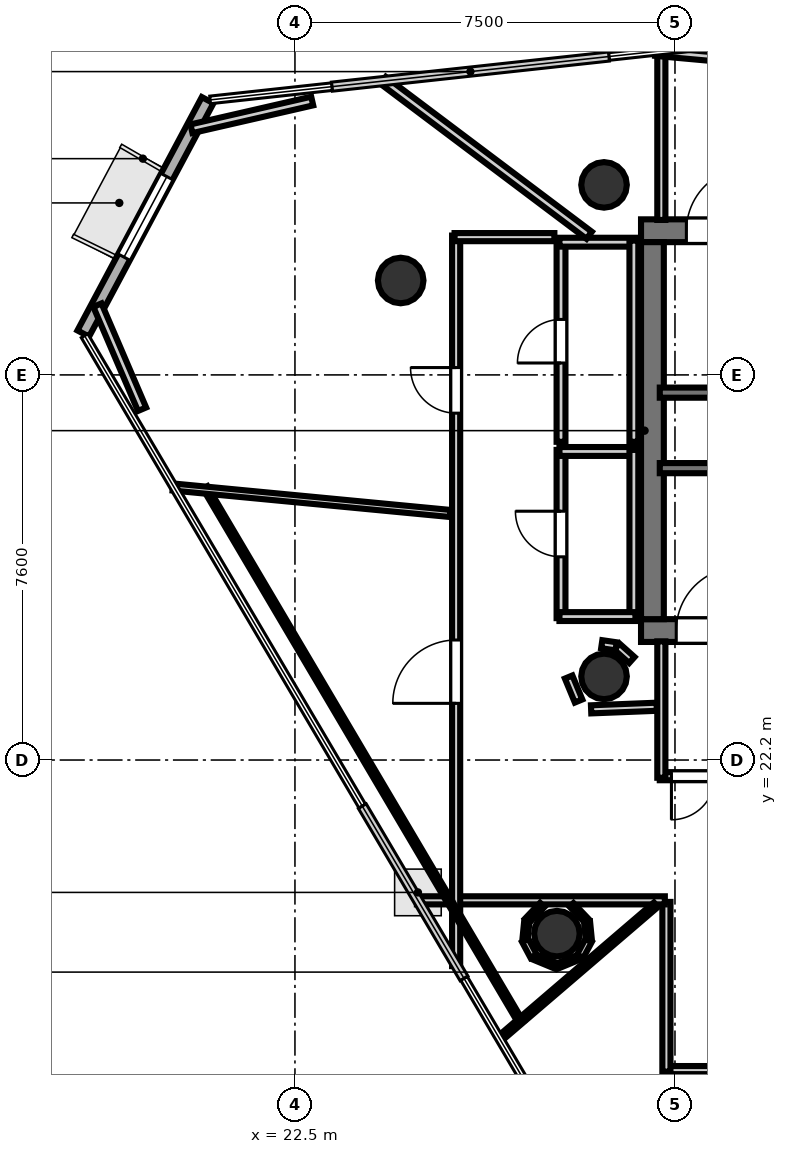
"""IFC4 building model, lengths in metres.
Left out: names, types, materials, properties, quantities, classifications, styles, units other than length and angle.
Written with IfcOpenShell. Run it as: python <this file> out.ifc"""

import sys

from ifc_helpers import new_model, si_unit, direction, frame, frame_2d, origin, origin_2d, place, context, subcontext, project, spatial, rectangle, hollow_circle, extrude, element, fill, save


model = new_model("IFC4")
c1 = context("Model", 3, precision=1e-05, world=origin(), true_north=direction((0.0, 1.0)))
c2 = subcontext(c1, "Body", "Model", "MODEL_VIEW")
j1 = project(units=[si_unit("LENGTHUNIT", "METRE"), si_unit("PLANEANGLEUNIT", "RADIAN")], contexts=[c1])
p1 = place(None, origin())
s1 = spatial("IfcSite", under=j1, at=p1, CompositionType="ELEMENT")
p2 = place(p1, origin())
s2 = spatial("IfcBuilding", under=s1, at=p2, CompositionType="ELEMENT")
p3 = place(p2, frame((0.0, 0.0, 280.6)))
s3 = spatial("IfcBuildingStorey", under=s2, at=p3, CompositionType="ELEMENT", Elevation=280.6)
p4 = place(p3, frame((29.33, 32.645, 0.0), z_axis=(0.0, 0.0, 1.0), x_axis=(1.0, 0.0, 0.0)))
e1 = element("IfcWall", 1, at=p4, inside=s3, PredefinedType="SHEAR", context=c2, shape_type="SweptSolid", body=[
    extrude(rectangle(XDim=10.52, YDim=0.45, at=frame_2d((5.26, 0.0))), origin(), (0.0, 0.0, 1.0), 3.52),
])
p5 = place(p4, frame((0.895, 0.0, 0.0)))
e2 = element("IfcOpeningElement", 2, at=p5, cuts=e1, PredefinedType="OPENING", context=c2, shape_type="SweptSolid", body=[
    extrude(rectangle(XDim=1.25, YDim=2.15, at=frame_2d((0.625, 1.075))), frame((0.0, 0.235, 0.0), z_axis=(0.0, -1.0, 0.0), x_axis=(1.0, 0.0, 0.0)), (0.0, 0.0, 1.0), 0.47),
])
p6 = place(p3, frame((29.33, 24.755, 0.0), z_axis=(0.0, 0.0, 1.0), x_axis=(1.0, 0.0, 0.0)))
e3 = element("IfcWall", 3, at=p6, inside=s3, PredefinedType="SHEAR", context=c2, shape_type="SweptSolid", body=[
    extrude(rectangle(XDim=10.52, YDim=0.45, at=frame_2d((5.26, 0.0))), origin(), (0.0, 0.0, 1.0), 3.52),
])
p7 = place(p6, frame((0.695, 0.0, 0.0)))
e4 = element("IfcOpeningElement", 4, at=p7, cuts=e3, PredefinedType="OPENING", context=c2, shape_type="SweptSolid", body=[
    extrude(rectangle(XDim=1.25, YDim=2.15, at=frame_2d((0.625, 1.075))), frame((0.0, 0.235, 0.0), z_axis=(0.0, -1.0, 0.0), x_axis=(1.0, 0.0, 0.0)), (0.0, 0.0, 1.0), 0.47),
])
p8 = place(p3, frame((29.555, 24.98, 0.0), z_axis=(0.0, 0.0, 1.0), x_axis=(0.0, 1.0, 0.0)))
e5 = element("IfcWall", 5, at=p8, inside=s3, PredefinedType="SHEAR", context=c2, shape_type="SweptSolid", body=[
    extrude(rectangle(XDim=7.44, YDim=0.45, at=frame_2d((3.72, 0.0))), origin(), (0.0, 0.0, 1.0), 3.52),
])
for number, where, z_axis, x_axis in (
    (6, (28.6, 33.55, 0.0), (0.0, 0.0, 1.0), (1.0, 0.0, 0.0)),
    (7, (28.6, 23.85, 0.0), (0.0, 0.0, 1.0), (1.0, 0.0, 0.0)),
):
    element("IfcColumn", number, at=place(p3, frame(where, z_axis=z_axis, x_axis=x_axis)), inside=s3, PredefinedType="COLUMN", context=c2, shape_type="SweptSolid", body=[
        extrude(hollow_circle(Radius=0.45, WallThickness=0.025, at=origin_2d()), origin(), (0.0, 0.0, 1.0), 3.7),
    ])
for number, where, z_axis, x_axis in (
    (8, (24.587, 31.663, -0.23), (0.0, 0.0, 1.0), (1.0, 0.0, 0.0)),
    (9, (27.67, 18.774, -0.23), (0.0, 0.0, 1.0), (1.0, 0.0, 0.0)),
):
    element("IfcColumn", number, at=place(p3, frame(where, z_axis=z_axis, x_axis=x_axis)), inside=s3, PredefinedType="COLUMN", context=c2, shape_type="SweptSolid", body=[
        extrude(hollow_circle(Radius=0.45, WallThickness=0.025, at=origin_2d()), origin(), (0.0, 0.0, 1.0), 3.93),
    ])
p9 = place(p3, frame((20.777, 35.221, 0.0), z_axis=(0.0, 0.0, 1.0), x_axis=(-0.470359968521, -0.882474645535, 0.0)))
e10 = element("IfcWall", 10, at=p9, inside=s3, PredefinedType="SOLIDWALL", context=c2, shape_type="SweptSolid", body=[
    extrude(rectangle(XDim=5.219, YDim=0.26, at=frame_2d((2.609, 0.0))), origin(), (0.0, 0.0, 1.0), 3.52),
])
p10 = place(p9, frame((1.709, 0.0, 0.85)))
e11 = element("IfcOpeningElement", 11, at=p10, cuts=e10, PredefinedType="OPENING", context=c2, shape_type="SweptSolid", body=[
    extrude(rectangle(XDim=1.8, YDim=2.1, at=frame_2d((0.9, 1.05))), frame((0.0, 0.14, 0.0), z_axis=(0.0, -1.0, 0.0), x_axis=(1.0, 0.0, 0.0)), (0.0, 0.0, 1.0), 0.28),
])
p11 = place(p3, frame((29.7, 29.45, 0.0), z_axis=(0.0, 0.0, 1.0), x_axis=(1.0, 0.0, 0.0)))
e12 = element("IfcWall", 12, at=p11, inside=s3, PredefinedType="SOLIDWALL", context=c2, shape_type="SweptSolid", body=[
    extrude(rectangle(XDim=8.3, YDim=0.2, at=frame_2d((4.15, 0.0))), origin(), (0.0, 0.0, 1.0), 3.52),
])
p12 = place(p3, frame((29.7, 27.96, 0.0), z_axis=(0.0, 0.0, 1.0), x_axis=(1.0, 0.0, 0.0)))
e13 = element("IfcWall", 13, at=p12, inside=s3, PredefinedType="SOLIDWALL", context=c2, shape_type="SweptSolid", body=[
    extrude(rectangle(XDim=7.75, YDim=0.2, at=frame_2d((3.875, 0.0))), origin(), (0.0, 0.0, 1.0), 3.52),
])
p13 = place(p3, frame((29.731, 32.858, 0.0), z_axis=(0.0, 0.0, 1.0), x_axis=(0.0, 1.0, 0.0)))
e14 = element("IfcWall", 14, at=p13, inside=s3, PredefinedType="PARTITIONING", context=c2, shape_type="SweptSolid", body=[
    extrude(rectangle(XDim=3.357, YDim=0.16, at=frame_2d((1.679, 0.0))), origin(), (0.0, 0.0, 1.0), 2.84),
])
p14 = place(p3, frame((33.45, 21.881, 0.0), z_axis=(0.0, 0.0, 1.0), x_axis=(-1.0, 0.0, 0.0)))
e15 = element("IfcWall", 15, at=p14, inside=s3, PredefinedType="PARTITIONING", context=c2, shape_type="SweptSolid", body=[
    extrude(rectangle(XDim=3.75, YDim=0.16, at=frame_2d((1.875, 0.0))), origin(), (0.0, 0.0, 1.0), 2.84),
])
p15 = place(p14, frame((1.275, 0.0, 0.0)))
e16 = element("IfcOpeningElement", 16, at=p15, cuts=e15, PredefinedType="OPENING", context=c2, shape_type="SweptSolid", body=[
    extrude(rectangle(XDim=1.2, YDim=2.15, at=frame_2d((0.6, 1.075))), frame((0.0, 0.09, 0.0), z_axis=(0.0, -1.0, 0.0), x_axis=(1.0, 0.0, 0.0)), (0.0, 0.0, 1.0), 0.18),
])
p16 = place(p14, frame((2.66, 0.0, 0.0)))
e17 = element("IfcOpeningElement", 17, at=p16, cuts=e15, PredefinedType="OPENING", context=c2, shape_type="SweptSolid", body=[
    extrude(rectangle(XDim=0.86, YDim=2.05, at=frame_2d((0.43, 1.025))), frame((0.0, 0.09, 0.0), z_axis=(0.0, -1.0, 0.0), x_axis=(1.0, 0.0, 0.0)), (0.0, 0.0, 1.0), 0.18),
])
p17 = place(p3, frame((29.731, 21.85, 0.0), z_axis=(0.0, 0.0, 1.0), x_axis=(0.0, 1.0, 0.0)))
e18 = element("IfcWall", 18, at=p17, inside=s3, PredefinedType="PARTITIONING", context=c2, shape_type="SweptSolid", body=[
    extrude(rectangle(XDim=2.692, YDim=0.16, at=frame_2d((1.346, 0.0))), origin(), (0.0, 0.0, 1.0), 2.84),
])
p18 = place(p3, frame((27.751, 25.0, 0.0), z_axis=(0.0, 0.0, 1.0), x_axis=(0.0, 1.0, 0.0)))
e19 = element("IfcWall", 19, at=p18, inside=s3, PredefinedType="PLUMBINGWALL", context=c2, shape_type="SweptSolid", body=[
    extrude(rectangle(XDim=3.32, YDim=0.175, at=frame_2d((1.66, 0.0))), origin(), (0.0, 0.0, 1.0), 2.84),
])
p19 = place(p18, frame((1.21, 0.0, 0.0)))
e20 = element("IfcOpeningElement", 20, at=p19, cuts=e19, PredefinedType="OPENING", context=c2, shape_type="SweptSolid", body=[
    extrude(rectangle(XDim=0.9, YDim=2.1, at=frame_2d((0.45, 1.05))), frame((0.0, 0.097, 0.0), z_axis=(0.0, -1.0, 0.0), x_axis=(1.0, 0.0, 0.0)), (0.0, 0.0, 1.0), 0.195),
])
p20 = place(p3, frame((27.72, 28.289, 0.0), z_axis=(0.0, 0.0, 1.0), x_axis=(1.0, 0.0, 0.0)))
e21 = element("IfcWall", 21, at=p20, inside=s3, PredefinedType="PLUMBINGWALL", context=c2, shape_type="SweptSolid", body=[
    extrude(rectangle(XDim=1.5, YDim=0.175, at=frame_2d((0.75, 0.0))), origin(), (0.0, 0.0, 1.0), 2.84),
])
p21 = place(p3, frame((29.189, 28.32, 0.0), z_axis=(0.0, 0.0, 1.0), x_axis=(0.0, -1.0, 0.0)))
e22 = element("IfcWall", 22, at=p21, inside=s3, PredefinedType="PLUMBINGWALL", context=c2, shape_type="SweptSolid", body=[
    extrude(rectangle(XDim=3.32, YDim=0.175, at=frame_2d((1.66, 0.0))), origin(), (0.0, 0.0, 1.0), 2.84),
])
p22 = place(p3, frame((29.22, 25.031, 0.0), z_axis=(0.0, 0.0, 1.0), x_axis=(-1.0, 0.0, 0.0)))
e23 = element("IfcWall", 23, at=p22, inside=s3, PredefinedType="PLUMBINGWALL", context=c2, shape_type="SweptSolid", body=[
    extrude(rectangle(XDim=1.5, YDim=0.175, at=frame_2d((0.75, 0.0))), origin(), (0.0, 0.0, 1.0), 2.84),
])
p23 = place(p3, frame((27.751, 28.48, 0.0), z_axis=(0.0, 0.0, 1.0), x_axis=(0.0, 1.0, 0.0)))
e24 = element("IfcWall", 24, at=p23, inside=s3, PredefinedType="PLUMBINGWALL", context=c2, shape_type="SweptSolid", body=[
    extrude(rectangle(XDim=3.97, YDim=0.175, at=frame_2d((1.985, 0.0))), origin(), (0.0, 0.0, 1.0), 2.84),
])
p24 = place(p23, frame((1.555, 0.0, 0.0)))
e25 = element("IfcOpeningElement", 25, at=p24, cuts=e24, PredefinedType="OPENING", context=c2, shape_type="SweptSolid", body=[
    extrude(rectangle(XDim=0.86, YDim=2.05, at=frame_2d((0.43, 1.025))), frame((0.0, 0.097, 0.0), z_axis=(0.0, -1.0, 0.0), x_axis=(1.0, 0.0, 0.0)), (0.0, 0.0, 1.0), 0.195),
])
p25 = place(p3, frame((27.72, 32.419, 0.0), z_axis=(0.0, 0.0, 1.0), x_axis=(1.0, 0.0, 0.0)))
e26 = element("IfcWall", 26, at=p25, inside=s3, PredefinedType="PLUMBINGWALL", context=c2, shape_type="SweptSolid", body=[
    extrude(rectangle(XDim=1.5, YDim=0.175, at=frame_2d((0.75, 0.0))), origin(), (0.0, 0.0, 1.0), 2.84),
])
p26 = place(p3, frame((29.189, 32.45, 0.0), z_axis=(0.0, 0.0, 1.0), x_axis=(0.0, -1.0, 0.0)))
e27 = element("IfcWall", 27, at=p26, inside=s3, PredefinedType="PLUMBINGWALL", context=c2, shape_type="SweptSolid", body=[
    extrude(rectangle(XDim=3.97, YDim=0.175, at=frame_2d((1.985, 0.0))), origin(), (0.0, 0.0, 1.0), 2.84),
])
p27 = place(p3, frame((29.149, 24.173, 0.0), z_axis=(0.0, 0.0, 1.0), x_axis=(-0.745225165416, 0.666812906917, 0.0)))
e28 = element("IfcWall", 28, at=p27, inside=s3, PredefinedType="PARTITIONING", context=c2, shape_type="SweptSolid", body=[
    extrude(rectangle(XDim=0.396, YDim=0.16, at=frame_2d((0.198, 0.0))), origin(), (0.0, 0.0, 1.0), 2.84),
])
p28 = place(p3, frame((28.838, 24.444, 0.0), z_axis=(0.0, 0.0, 1.0), x_axis=(-0.989449148305, 0.144880581578, 0.0)))
e29 = element("IfcWall", 29, at=p28, inside=s3, PredefinedType="PARTITIONING", context=c2, shape_type="SweptSolid", body=[
    extrude(rectangle(XDim=0.286, YDim=0.16, at=frame_2d((0.143, 0.0))), origin(), (0.0, 0.0, 1.0), 2.84),
])
p29 = place(p3, frame((27.901, 23.838, 0.0), z_axis=(0.0, 0.0, 1.0), x_axis=(0.382856448334, -0.923807847969, 0.0)))
e30 = element("IfcWall", 30, at=p29, inside=s3, PredefinedType="PARTITIONING", context=c2, shape_type="SweptSolid", body=[
    extrude(rectangle(XDim=0.513, YDim=0.16, at=frame_2d((0.256, 0.0))), origin(), (0.0, 0.0, 1.0), 2.84),
])
p30 = place(p3, frame((28.345, 23.2, 0.0), z_axis=(0.0, 0.0, 1.0), x_axis=(0.999216536924, 0.039576664043, 0.0)))
e31 = element("IfcWall", 31, at=p30, inside=s3, PredefinedType="PARTITIONING", context=c2, shape_type="SweptSolid", body=[
    extrude(rectangle(XDim=1.295, YDim=0.16, at=frame_2d((0.648, 0.0))), origin(), (0.0, 0.0, 1.0), 2.84),
])
p31 = place(p3, frame((43.965, 16.081, 0.0), z_axis=(0.0, 0.0, 1.0), x_axis=(-1.0, 0.0, 0.0)))
e32 = element("IfcWall", 32, at=p31, inside=s3, PredefinedType="PARTITIONING", context=c2, shape_type="SweptSolid", body=[
    extrude(rectangle(XDim=14.165, YDim=0.16, at=frame_2d((7.083, 0.0))), origin(), (0.0, 0.0, 1.0), 2.84),
])
p32 = place(p31, frame((8.701, 0.0, 0.0)))
e33 = element("IfcOpeningElement", 33, at=p32, cuts=e32, PredefinedType="OPENING", context=c2, shape_type="SweptSolid", body=[
    extrude(rectangle(XDim=1.25, YDim=2.2, at=frame_2d((0.625, 1.1))), frame((0.0, 0.09, 0.0), z_axis=(0.0, -1.0, 0.0), x_axis=(1.0, 0.0, 0.0)), (0.0, 0.0, 1.0), 0.18),
])
p33 = place(p3, frame((29.831, 16.05, 0.0), z_axis=(0.0, 0.0, 1.0), x_axis=(0.0, 1.0, 0.0)))
e34 = element("IfcWall", 34, at=p33, inside=s3, PredefinedType="PARTITIONING", context=c2, shape_type="SweptSolid", body=[
    extrude(rectangle(XDim=3.35, YDim=0.16, at=frame_2d((1.675, 0.0))), origin(), (0.0, 0.0, 1.0), 2.84),
])
p34 = place(p3, frame((29.8, 19.431, 0.0), z_axis=(0.0, 0.0, 1.0), x_axis=(-1.0, 0.0, 0.0)))
e35 = element("IfcWall", 35, at=p34, inside=s3, PredefinedType="PARTITIONING", context=c2, shape_type="SweptSolid", body=[
    extrude(rectangle(XDim=4.894, YDim=0.16, at=frame_2d((2.447, 0.0))), origin(), (0.0, 0.0, 1.0), 2.84),
])
p35 = place(p3, frame((25.681, 18.133, 0.0), z_axis=(0.0, 0.0, 1.0), x_axis=(0.0, 1.0, 0.0)))
e36 = element("IfcWall", 36, at=p35, inside=s3, PredefinedType="PARTITIONING", context=c2, shape_type="SweptSolid", body=[
    extrude(rectangle(XDim=14.417, YDim=0.16, at=frame_2d((7.208, 0.0))), origin(), (0.0, 0.0, 1.0), 2.84),
])
p36 = place(p35, frame((5.186, 0.0, 0.0)))
e37 = element("IfcOpeningElement", 37, at=p36, cuts=e36, PredefinedType="OPENING", context=c2, shape_type="SweptSolid", body=[
    extrude(rectangle(XDim=1.25, YDim=2.2, at=frame_2d((0.625, 1.1))), frame((0.0, 0.09, 0.0), z_axis=(0.0, -1.0, 0.0), x_axis=(1.0, 0.0, 0.0)), (0.0, 0.0, 1.0), 0.18),
])
p37 = place(p35, frame((10.912, 0.0, 0.0)))
e38 = element("IfcOpeningElement", 38, at=p37, cuts=e36, PredefinedType="OPENING", context=c2, shape_type="SweptSolid", body=[
    extrude(rectangle(XDim=0.9, YDim=2.1, at=frame_2d((0.45, 1.05))), frame((0.0, 0.09, 0.0), z_axis=(0.0, -1.0, 0.0), x_axis=(1.0, 0.0, 0.0)), (0.0, 0.0, 1.0), 0.18),
])
p38 = place(p3, frame((25.65, 32.519, 0.0), z_axis=(0.0, 0.0, 1.0), x_axis=(1.0, 0.0, 0.0)))
e39 = element("IfcWall", 39, at=p38, inside=s3, PredefinedType="PARTITIONING", context=c2, shape_type="SweptSolid", body=[
    extrude(rectangle(XDim=1.97, YDim=0.16, at=frame_2d((0.985, 0.0))), origin(), (0.0, 0.0, 1.0), 2.84),
])
p39 = place(p3, frame((27.381, 19.341, 0.0), z_axis=(0.0, 0.0, 1.0), x_axis=(-0.689047004353, -0.724716652073, 0.0)))
e40 = element("IfcWall", 40, at=p39, inside=s3, PredefinedType="PARTITIONING", context=c2, shape_type="SweptSolid", body=[
    extrude(rectangle(XDim=0.431, YDim=0.12, at=frame_2d((0.216, 0.0))), origin(), (0.0, 0.0, 1.0), 2.84),
])
p40 = place(p3, frame((27.076, 19.01, 0.0), z_axis=(0.0, 0.0, 1.0), x_axis=(-0.097865889817, -0.995199611942, 0.0)))
e41 = element("IfcWall", 41, at=p40, inside=s3, PredefinedType="PARTITIONING", context=c2, shape_type="SweptSolid", body=[
    extrude(rectangle(XDim=0.354, YDim=0.105, at=frame_2d((0.177, 0.0))), origin(), (0.0, 0.0, 1.0), 2.84),
])
p41 = place(p3, frame((27.044, 18.64, 0.0), z_axis=(0.0, 0.0, 1.0), x_axis=(0.471053526925, -0.882104628019, 0.0)))
e42 = element("IfcWall", 42, at=p41, inside=s3, PredefinedType="PARTITIONING", context=c2, shape_type="SweptSolid", body=[
    extrude(rectangle(XDim=0.354, YDim=0.14, at=frame_2d((0.177, 0.0))), origin(), (0.0, 0.0, 1.0), 2.84),
])
p42 = place(p3, frame((27.227, 18.314, 0.0), z_axis=(0.0, 0.0, 1.0), x_axis=(0.924048683901, -0.382274809242, 0.0)))
e43 = element("IfcWall", 43, at=p42, inside=s3, PredefinedType="PARTITIONING", context=c2, shape_type="SweptSolid", body=[
    extrude(rectangle(XDim=0.467, YDim=0.12, at=frame_2d((0.233, 0.0))), origin(), (0.0, 0.0, 1.0), 2.84),
])
p43 = place(p3, frame((27.682, 18.135, 0.0), z_axis=(0.0, 0.0, 1.0), x_axis=(0.924048683901, 0.382274809242, 0.0)))
e44 = element("IfcWall", 44, at=p43, inside=s3, PredefinedType="PARTITIONING", context=c2, shape_type="SweptSolid", body=[
    extrude(rectangle(XDim=0.467, YDim=0.105, at=frame_2d((0.233, 0.0))), origin(), (0.0, 0.0, 1.0), 2.84),
])
p44 = place(p3, frame((28.129, 18.328, 0.0), z_axis=(0.0, 0.0, 1.0), x_axis=(0.471589913721, 0.881817981942, 0.0)))
e45 = element("IfcWall", 45, at=p44, inside=s3, PredefinedType="PARTITIONING", context=c2, shape_type="SweptSolid", body=[
    extrude(rectangle(XDim=0.354, YDim=0.14, at=frame_2d((0.177, 0.0))), origin(), (0.0, 0.0, 1.0), 2.84),
])
p45 = place(p3, frame((28.299, 18.658, 0.0), z_axis=(0.0, 0.0, 1.0), x_axis=(-0.097865889817, 0.995199611942, 0.0)))
e46 = element("IfcWall", 46, at=p45, inside=s3, PredefinedType="PARTITIONING", context=c2, shape_type="SweptSolid", body=[
    extrude(rectangle(XDim=0.354, YDim=0.12, at=frame_2d((0.177, 0.0))), origin(), (0.0, 0.0, 1.0), 2.84),
])
p46 = place(p3, frame((28.256, 19.029, 0.0), z_axis=(0.0, 0.0, 1.0), x_axis=(-0.689344198757, 0.724433969137, 0.0)))
e47 = element("IfcWall", 47, at=p46, inside=s3, PredefinedType="PARTITIONING", context=c2, shape_type="SweptSolid", body=[
    extrude(rectangle(XDim=0.431, YDim=0.105, at=frame_2d((0.216, 0.0))), origin(), (0.0, 0.0, 1.0), 2.84),
])
p47 = place(p3, frame((29.624, 19.344, 0.0), z_axis=(0.0, 0.0, 1.0), x_axis=(-0.759205946939, -0.650850466799, 0.0)))
e48 = element("IfcWall", 48, at=p47, inside=s3, PredefinedType="PARTITIONING", context=c2, shape_type="SweptSolid", body=[
    extrude(rectangle(XDim=4.083, YDim=0.12, at=frame_2d((2.042, 0.0))), origin(), (0.0, 0.0, 1.0), 2.84),
])
p48 = place(p3, frame((26.964, 17.015, 0.0), z_axis=(0.0, 0.0, 1.0), x_axis=(-0.508423474714, 0.861107177046, 0.0)))
e49 = element("IfcWall", 49, at=p48, inside=s3, PredefinedType="PARTITIONING", context=c2, shape_type="SweptSolid", body=[
    extrude(rectangle(XDim=12.265, YDim=0.105, at=frame_2d((6.133, 0.0))), origin(), (0.0, 0.0, 1.0), 2.84),
])
p49 = place(p3, frame((20.091, 27.588, 0.0), z_axis=(0.0, 0.0, 1.0), x_axis=(0.995474903203, -0.095024823566, 0.0)))
e50 = element("IfcWall", 50, at=p49, inside=s3, PredefinedType="PARTITIONING", context=c2, shape_type="SweptSolid", body=[
    extrude(rectangle(XDim=5.501, YDim=0.14, at=frame_2d((2.75, 0.0))), origin(), (0.0, 0.0, 1.0), 2.84),
])
p50 = place(p3, frame((35.933, 35.611, 0.0), z_axis=(0.0, 0.0, 1.0), x_axis=(-0.995921239294, 0.090226853666, 0.0)))
e51 = element("IfcWall", 51, at=p50, inside=s3, PredefinedType="PLUMBINGWALL", context=c2, shape_type="SweptSolid", body=[
    extrude(rectangle(XDim=6.343, YDim=0.175, at=frame_2d((3.171, 0.0))), origin(), (0.0, 0.0, 1.0), 2.84),
])
p51 = place(p3, frame((28.307, 32.555, 0.0), z_axis=(0.0, 0.0, 1.0), x_axis=(-0.799198697227, 0.601066920027, 0.0)))
e52 = element("IfcWall", 52, at=p51, inside=s3, PredefinedType="PLUMBINGWALL", context=c2, shape_type="SweptSolid", body=[
    extrude(rectangle(XDim=5.087, YDim=0.175, at=frame_2d((2.543, 0.0))), origin(), (0.0, 0.0, 1.0), 2.84),
])
p52 = place(p3, frame((20.457, 34.658, 0.0), z_axis=(0.0, 0.0, 1.0), x_axis=(0.974674773873, 0.223627111899, 0.0)))
e53 = element("IfcWall", 53, at=p52, inside=s3, PredefinedType="PLUMBINGWALL", context=c2, shape_type="SweptSolid", body=[
    extrude(rectangle(XDim=2.446, YDim=0.175, at=frame_2d((1.223, 0.0))), origin(), (0.0, 0.0, 1.0), 2.84),
])
p53 = place(p3, frame((19.483, 29.123, 0.0), z_axis=(0.0, 0.0, 1.0), x_axis=(-0.394064292103, 0.919082876399, 0.0)))
e54 = element("IfcWall", 54, at=p53, inside=s3, PredefinedType="PLUMBINGWALL", context=c2, shape_type="SweptSolid", body=[
    extrude(rectangle(XDim=2.235, YDim=0.175, at=frame_2d((1.118, 0.0))), origin(), (0.0, 0.0, 1.0), 2.84),
])
p54 = place(p5, origin())
e55 = element("IfcDoor", 55, at=p54, inside=s3, OperationType="SINGLE_SWING_RIGHT", PredefinedType="DOOR", context=c2, shape_type="SweptSolid", body=[
    extrude(rectangle(XDim=1.25, YDim=2.15, at=frame_2d((0.625, 1.075))), frame((0.0, 0.025, 0.0), z_axis=(0.0, -1.0, 0.0), x_axis=(1.0, 0.0, 0.0)), (0.0, 0.0, 1.0), 0.05),
])
fill(e2, e55)
p55 = place(p7, origin())
e56 = element("IfcDoor", 56, at=p55, inside=s3, OperationType="SINGLE_SWING_RIGHT", PredefinedType="DOOR", context=c2, shape_type="SweptSolid", body=[
    extrude(rectangle(XDim=1.25, YDim=2.15, at=frame_2d((0.625, 1.075))), frame((0.0, 0.025, 0.0), z_axis=(0.0, -1.0, 0.0), x_axis=(1.0, 0.0, 0.0)), (0.0, 0.0, 1.0), 0.05),
])
fill(e4, e56)
p56 = place(p19, origin())
e57 = element("IfcDoor", 57, at=p56, inside=s3, OperationType="SINGLE_SWING_RIGHT", PredefinedType="DOOR", context=c2, shape_type="SweptSolid", body=[
    extrude(rectangle(XDim=0.9, YDim=2.1, at=frame_2d((0.45, 1.05))), frame((0.0, 0.025, 0.0), z_axis=(0.0, -1.0, 0.0), x_axis=(1.0, 0.0, 0.0)), (0.0, 0.0, 1.0), 0.05),
])
fill(e20, e57)
p57 = place(p24, origin())
e58 = element("IfcDoor", 58, at=p57, inside=s3, OperationType="SINGLE_SWING_LEFT", PredefinedType="DOOR", context=c2, shape_type="SweptSolid", body=[
    extrude(rectangle(XDim=0.86, YDim=2.05, at=frame_2d((0.43, 1.025))), frame((0.0, 0.025, 0.0), z_axis=(0.0, -1.0, 0.0), x_axis=(1.0, 0.0, 0.0)), (0.0, 0.0, 1.0), 0.05),
])
fill(e25, e58)
p58 = place(p16, origin())
e59 = element("IfcDoor", 59, at=p58, inside=s3, OperationType="SINGLE_SWING_RIGHT", PredefinedType="DOOR", context=c2, shape_type="SweptSolid", body=[
    extrude(rectangle(XDim=0.86, YDim=2.05, at=frame_2d((0.43, 1.025))), frame((0.0, 0.025, 0.0), z_axis=(0.0, -1.0, 0.0), x_axis=(1.0, 0.0, 0.0)), (0.0, 0.0, 1.0), 0.05),
])
fill(e17, e59)
p59 = place(p36, origin())
e60 = element("IfcDoor", 60, at=p59, inside=s3, OperationType="SINGLE_SWING_LEFT", PredefinedType="DOOR", context=c2, shape_type="SweptSolid", body=[
    extrude(rectangle(XDim=1.25, YDim=2.2, at=frame_2d((0.625, 1.1))), frame((0.0, 0.025, 0.0), z_axis=(0.0, -1.0, 0.0), x_axis=(1.0, 0.0, 0.0)), (0.0, 0.0, 1.0), 0.05),
])
fill(e37, e60)
p60 = place(p37, origin())
e61 = element("IfcDoor", 61, at=p60, inside=s3, OperationType="SINGLE_SWING_RIGHT", PredefinedType="DOOR", context=c2, shape_type="SweptSolid", body=[
    extrude(rectangle(XDim=0.9, YDim=2.1, at=frame_2d((0.45, 1.05))), frame((0.0, 0.025, 0.0), z_axis=(0.0, -1.0, 0.0), x_axis=(1.0, 0.0, 0.0)), (0.0, 0.0, 1.0), 0.05),
])
fill(e38, e61)
p61 = place(p10, origin())
e62 = element("IfcWindow", 62, at=p61, inside=s3, PartitioningType="SINGLE_PANEL", PredefinedType="WINDOW", context=c2, shape_type="SweptSolid", body=[
    extrude(rectangle(XDim=1.8, YDim=2.1, at=frame_2d((0.9, 1.05))), frame((0.0, 0.03, 0.0), z_axis=(0.0, -1.0, 0.0), x_axis=(1.0, 0.0, 0.0)), (0.0, 0.0, 1.0), 0.06),
])
fill(e11, e62)
save(model, sys.argv[1])
